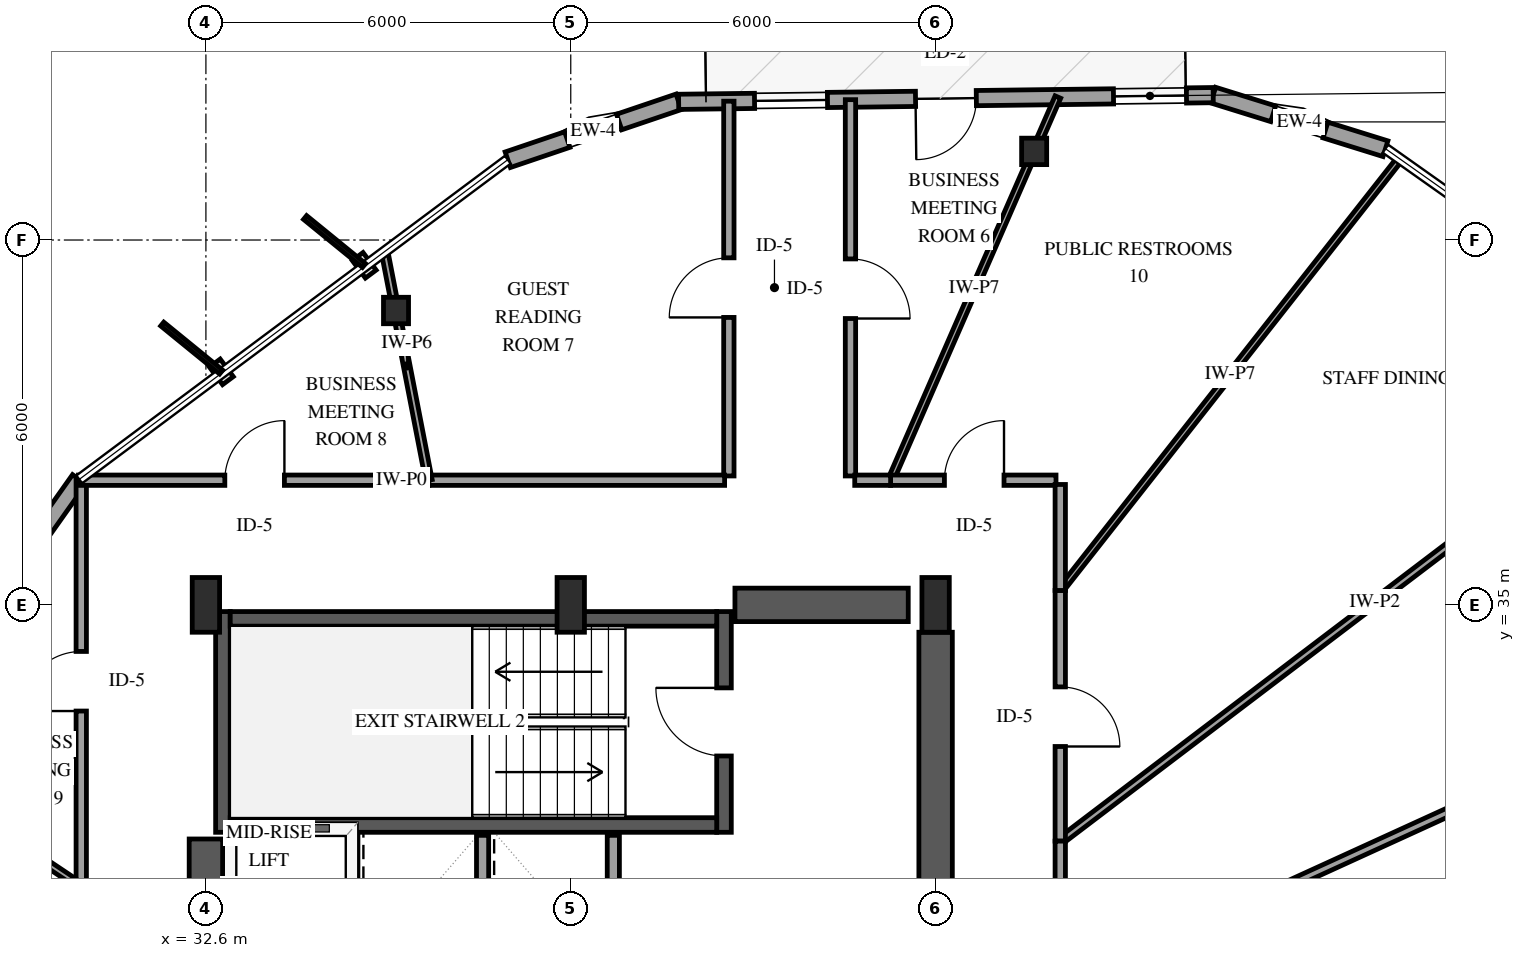
"""IFC4 building model, lengths in metres.
Left out: names, types, materials, properties, quantities, classifications, styles, units other than length and angle.
Written with IfcOpenShell. Run it as: python <this file> out.ifc"""

import sys

from ifc_helpers import new_model, si_unit, direction, frame, frame_2d, origin, origin_2d, place, context, subcontext, project, spatial, rectangle, i_section, extrude, element, fill, save


model = new_model("IFC4")
c1 = context("Model", 3, precision=1e-05, world=origin(), true_north=direction((0.0, 1.0)))
c2 = subcontext(c1, "Body", "Model", "MODEL_VIEW")
j1 = project(units=[si_unit("LENGTHUNIT", "METRE"), si_unit("PLANEANGLEUNIT", "RADIAN")], contexts=[c1])
p1 = place(None, origin())
s1 = spatial("IfcSite", under=j1, at=p1, CompositionType="ELEMENT")
p2 = place(p1, origin())
s2 = spatial("IfcBuilding", under=s1, at=p2, CompositionType="ELEMENT")
p3 = place(p2, frame((0.0, 0.0, 167.8)))
s3 = spatial("IfcBuildingStorey", under=s2, at=p3, CompositionType="ELEMENT", Elevation=167.8)
p4 = place(p3, frame((32.88, 31.26, 0.0), z_axis=(0.0, 0.0, 1.0), x_axis=(0.0, 1.0, 0.0)))
e1 = element("IfcWall", 1, at=p4, inside=s3, PredefinedType="SHEAR", context=c2, shape_type="SweptSolid", body=[
    extrude(rectangle(XDim=3.63, YDim=0.24, at=frame_2d((1.815, 0.0))), origin(), (0.0, 0.0, 1.0), 3.6),
])
p5 = place(p3, frame((41.12, 31.26, 0.0), z_axis=(0.0, 0.0, 1.0), x_axis=(0.0, 1.0, 0.0)))
e2 = element("IfcWall", 2, at=p5, inside=s3, PredefinedType="SHEAR", context=c2, shape_type="SweptSolid", body=[
    extrude(rectangle(XDim=3.63, YDim=0.24, at=frame_2d((1.815, 0.0))), origin(), (0.0, 0.0, 1.0), 3.6),
])
p6 = place(p5, frame((1.255, 0.0, 0.0)))
e3 = element("IfcOpeningElement", 3, at=p6, cuts=e2, PredefinedType="OPENING", context=c2, shape_type="SweptSolid", body=[
    extrude(rectangle(XDim=1.12, YDim=2.15, at=frame_2d((0.56, 1.075))), frame((0.0, 0.13, 0.0), z_axis=(0.0, -1.0, 0.0), x_axis=(1.0, 0.0, 0.0)), (0.0, 0.0, 1.0), 0.26),
])
for number, where, z_axis, x_axis in (
    (4, (33.0, 31.38, 0.0), (0.0, 0.0, 1.0), (1.0, 0.0, 0.0)),
    (5, (33.0, 34.77, 0.0), (0.0, 0.0, 1.0), (1.0, 0.0, 0.0)),
):
    element("IfcWall", number, at=place(p3, frame(where, z_axis=z_axis, x_axis=x_axis)), inside=s3, PredefinedType="SHEAR", context=c2, shape_type="SweptSolid", body=[
        extrude(rectangle(XDim=8.0, YDim=0.24, at=frame_2d((4.0, 0.0))), origin(), (0.0, 0.0, 1.0), 3.6),
    ])
p7 = place(p3, frame((32.6, 18.85, 0.0), z_axis=(0.0, 0.0, 1.0), x_axis=(0.0, 1.0, 0.0)))
e6 = element("IfcWall", 6, at=p7, inside=s3, PredefinedType="SHEAR", context=c2, shape_type="SweptSolid", body=[
    extrude(rectangle(XDim=12.3, YDim=0.55, at=frame_2d((6.15, 0.0))), origin(), (0.0, 0.0, 1.0), 3.6),
])
p8 = place(p3, frame((41.3, 35.0, 0.0), z_axis=(0.0, 0.0, 1.0), x_axis=(1.0, 0.0, 0.0)))
e7 = element("IfcWall", 7, at=p8, inside=s3, PredefinedType="SHEAR", context=c2, shape_type="SweptSolid", body=[
    extrude(rectangle(XDim=2.85, YDim=0.55, at=frame_2d((1.425, 0.0))), origin(), (0.0, 0.0, 1.0), 3.6),
])
p9 = place(p3, frame((44.6, 29.8, 0.0), z_axis=(0.0, 0.0, 1.0), x_axis=(0.0, 1.0, 0.0)))
e8 = element("IfcWall", 8, at=p9, inside=s3, PredefinedType="SHEAR", context=c2, shape_type="SweptSolid", body=[
    extrude(rectangle(XDim=4.75, YDim=0.55, at=frame_2d((2.375, 0.0))), origin(), (0.0, 0.0, 1.0), 3.6),
])
for number, where, z_axis, x_axis in (
    (9, (32.6, 35.0, 0.0), (0.0, 0.0, 1.0), (1.0, 0.0, 0.0)),
    (10, (38.6, 35.0, 0.0), (0.0, 0.0, 1.0), (1.0, 0.0, 0.0)),
    (11, (44.6, 35.0, 0.0), (0.0, 0.0, 1.0), (1.0, 0.0, 0.0)),
):
    element("IfcColumn", number, at=place(p3, frame(where, z_axis=z_axis, x_axis=x_axis)), inside=s3, PredefinedType="PILASTER", context=c2, shape_type="SweptSolid", body=[
        extrude(rectangle(XDim=0.45, YDim=0.9, at=origin_2d()), origin(), (0.0, 0.0, 1.0), 3.6),
    ])
for number, where, z_axis, x_axis in (
    (12, (46.221, 42.458, 0.0), (0.0, 0.0, 1.0), (1.0, 0.0, 0.0)),
    (13, (35.726, 39.841, 0.0), (0.0, 0.0, 1.0), (1.0, 0.0, 0.0)),
):
    element("IfcColumn", number, at=place(p3, frame(where, z_axis=z_axis, x_axis=x_axis)), inside=s3, PredefinedType="COLUMN", context=c2, shape_type="SweptSolid", body=[
        extrude(i_section(OverallWidth=0.412, OverallDepth=0.435, WebThickness=0.036, FlangeThickness=0.057, FilletRadius=0.038, at=origin_2d()), origin(), (0.0, 0.0, 1.0), 3.6),
    ])
p10 = place(p3, frame((51.998, 42.502, 0.0), z_axis=(0.0, 0.0, 1.0), x_axis=(-0.954868707694, 0.29702819911, 0.0)))
e14 = element("IfcWall", 14, at=p10, inside=s3, PredefinedType="SOLIDWALL", context=c2, shape_type="SweptSolid", body=[
    extrude(rectangle(XDim=2.966, YDim=0.27, at=frame_2d((1.483, 0.0))), origin(), (0.0, 0.0, 1.0), 2.679),
])
p11 = place(p10, frame((1.033, 0.0, 0.75)))
e15 = element("IfcOpeningElement", 15, at=p11, cuts=e14, PredefinedType="OPENING", context=c2, shape_type="SweptSolid", body=[
    extrude(rectangle(XDim=0.9, YDim=1.5, at=frame_2d((0.45, 0.75))), frame((0.0, 0.145, 0.0), z_axis=(0.0, -1.0, 0.0), x_axis=(1.0, 0.0, 0.0)), (0.0, 0.0, 1.0), 0.29),
])
p12 = place(p3, frame((40.374, 43.272, 0.0), z_axis=(0.0, 0.0, 1.0), x_axis=(-0.947099800271, -0.320939197242, 0.0)))
e16 = element("IfcWall", 16, at=p12, inside=s3, PredefinedType="SOLIDWALL", context=c2, shape_type="SweptSolid", body=[
    extrude(rectangle(XDim=2.967, YDim=0.27, at=frame_2d((1.483, 0.0))), origin(), (0.0, 0.0, 1.0), 2.679),
])
p13 = place(p12, frame((1.033, 0.0, 0.75)))
e17 = element("IfcOpeningElement", 17, at=p13, cuts=e16, PredefinedType="OPENING", context=c2, shape_type="SweptSolid", body=[
    extrude(rectangle(XDim=0.9, YDim=1.5, at=frame_2d((0.45, 0.75))), frame((0.0, 0.145, 0.0), z_axis=(0.0, -1.0, 0.0), x_axis=(1.0, 0.0, 0.0)), (0.0, 0.0, 1.0), 0.29),
])
p14 = place(p3, frame((49.165, 43.383, 0.0), z_axis=(0.0, 0.0, 1.0), x_axis=(-0.999921223342, -0.012551777187, 0.0)))
e18 = element("IfcWall", 18, at=p14, inside=s3, PredefinedType="SOLIDWALL", context=c2, shape_type="SweptSolid", body=[
    extrude(rectangle(XDim=8.792, YDim=0.25, at=frame_2d((4.396, 0.0))), origin(), (0.0, 0.0, 1.0), 2.679),
])
p15 = place(p14, frame((3.896, 0.0, 0.0)))
e19 = element("IfcOpeningElement", 19, at=p15, cuts=e18, PredefinedType="OPENING", context=c2, shape_type="SweptSolid", body=[
    extrude(rectangle(XDim=1.0, YDim=2.15, at=frame_2d((0.5, 1.075))), frame((0.0, 0.135, 0.0), z_axis=(0.0, -1.0, 0.0), x_axis=(1.0, 0.0, 0.0)), (0.0, 0.0, 1.0), 0.27),
])
p16 = place(p14, frame((0.44, 0.0, 0.72)))
e20 = element("IfcOpeningElement", 20, at=p16, cuts=e18, PredefinedType="OPENING", context=c2, shape_type="SweptSolid", body=[
    extrude(rectangle(XDim=1.2, YDim=1.6, at=frame_2d((0.6, 0.8))), frame((0.0, 0.135, 0.0), z_axis=(0.0, -1.0, 0.0), x_axis=(1.0, 0.0, 0.0)), (0.0, 0.0, 1.0), 0.27),
])
p17 = place(p14, frame((6.344, 0.0, 0.72)))
e21 = element("IfcOpeningElement", 21, at=p17, cuts=e18, PredefinedType="OPENING", context=c2, shape_type="SweptSolid", body=[
    extrude(rectangle(XDim=1.2, YDim=1.6, at=frame_2d((0.6, 0.8))), frame((0.0, 0.135, 0.0), z_axis=(0.0, -1.0, 0.0), x_axis=(1.0, 0.0, 0.0)), (0.0, 0.0, 1.0), 0.27),
])
p18 = place(p3, frame((30.517, 37.064, 0.0), z_axis=(0.0, 0.0, 1.0), x_axis=(-0.577542313639, -0.816360751112, 0.0)))
e22 = element("IfcWall", 22, at=p18, inside=s3, PredefinedType="SOLIDWALL", context=c2, shape_type="SweptSolid", body=[
    extrude(rectangle(XDim=2.967, YDim=0.27, at=frame_2d((1.483, 0.0))), origin(), (0.0, 0.0, 1.0), 2.679),
])
p19 = place(p18, frame((1.519, 0.0, 0.75)))
e23 = element("IfcOpeningElement", 23, at=p19, cuts=e22, PredefinedType="OPENING", context=c2, shape_type="SweptSolid", body=[
    extrude(rectangle(XDim=0.9, YDim=1.5, at=frame_2d((0.45, 0.75))), frame((0.0, 0.145, 0.0), z_axis=(0.0, -1.0, 0.0), x_axis=(1.0, 0.0, 0.0)), (0.0, 0.0, 1.0), 0.29),
])
for number, where, z_axis, x_axis in (
    (24, (35.0, 29.11, 0.0), (0.0, 0.0, 1.0), (0.0, 1.0, 0.0)),
    (25, (37.15, 29.11, 0.0), (0.0, 0.0, 1.0), (0.0, 1.0, 0.0)),
    (26, (39.3, 29.11, 0.0), (0.0, 0.0, 1.0), (0.0, 1.0, 0.0)),
):
    element("IfcWall", number, at=place(p3, frame(where, z_axis=z_axis, x_axis=x_axis)), inside=s3, PredefinedType="SOLIDWALL", context=c2, shape_type="SweptSolid", body=[
        extrude(rectangle(XDim=2.1, YDim=0.2, at=frame_2d((1.05, 0.0))), origin(), (0.0, 0.0, 1.0), 3.3),
    ])
p20 = place(p3, frame((46.65, 28.677, 0.0), z_axis=(0.0, 0.0, 1.0), x_axis=(0.909598522635, 0.41548830022, 0.0)))
e27 = element("IfcWall", 27, at=p20, inside=s3, PredefinedType="PARTITIONING", context=c2, shape_type="SweptSolid", body=[
    extrude(rectangle(XDim=15.644, YDim=0.14, at=frame_2d((7.822, 0.0))), origin(), (0.0, 0.0, 1.0), 3.3),
])
p21 = place(p3, frame((46.65, 31.115, 0.0), z_axis=(0.0, 0.0, 1.0), x_axis=(0.796355255038, 0.604829155856, 0.0)))
e28 = element("IfcWall", 28, at=p21, inside=s3, PredefinedType="PARTITIONING", context=c2, shape_type="SweptSolid", body=[
    extrude(rectangle(XDim=12.986, YDim=0.12, at=frame_2d((6.493, 0.0))), origin(), (0.0, 0.0, 1.0), 3.3),
])
p22 = place(p3, frame((46.65, 35.237, 0.0), z_axis=(0.0, 0.0, 1.0), x_axis=(0.618238163574, 0.785990822529, 0.0)))
e29 = element("IfcWall", 29, at=p22, inside=s3, PredefinedType="PARTITIONING", context=c2, shape_type="SweptSolid", body=[
    extrude(rectangle(XDim=9.031, YDim=0.1, at=frame_2d((4.515, 0.0))), origin(), (0.0, 0.0, 1.0), 3.3),
])
p23 = place(p3, frame((43.86, 37.05, 0.0), z_axis=(0.0, 0.0, 1.0), x_axis=(0.400120171494, 0.916462682472, 0.0)))
e30 = element("IfcWall", 30, at=p23, inside=s3, PredefinedType="PARTITIONING", context=c2, shape_type="SweptSolid", body=[
    extrude(rectangle(XDim=6.875, YDim=0.1, at=frame_2d((3.438, 0.0))), origin(), (0.0, 0.0, 1.0), 2.595),
])
p24 = place(p3, frame((30.55, 30.37, 0.0), z_axis=(0.0, 0.0, 1.0), x_axis=(0.0, 1.0, 0.0)))
e31 = element("IfcWall", 31, at=p24, inside=s3, PredefinedType="PARTITIONING", context=c2, shape_type="SweptSolid", body=[
    extrude(rectangle(XDim=6.718, YDim=0.17, at=frame_2d((3.359, 0.0))), origin(), (0.0, 0.0, 1.0), 3.3),
])
p25 = place(p24, frame((2.884, 0.0, 0.0)))
e32 = element("IfcOpeningElement", 32, at=p25, cuts=e31, PredefinedType="OPENING", context=c2, shape_type="SweptSolid", body=[
    extrude(rectangle(XDim=0.98, YDim=2.15, at=frame_2d((0.49, 1.075))), frame((0.0, 0.095, 0.0), z_axis=(0.0, -1.0, 0.0), x_axis=(1.0, 0.0, 0.0)), (0.0, 0.0, 1.0), 0.19),
])
p26 = place(p3, frame((43.2, 43.308, 0.0), z_axis=(0.0, 0.0, 1.0), x_axis=(0.0, -1.0, 0.0)))
e33 = element("IfcWall", 33, at=p26, inside=s3, PredefinedType="PARTITIONING", context=c2, shape_type="SweptSolid", body=[
    extrude(rectangle(XDim=6.188, YDim=0.17, at=frame_2d((3.094, 0.0))), origin(), (0.0, 0.0, 1.0), 3.3),
])
p27 = place(p26, frame((2.619, 0.0, 0.0)))
e34 = element("IfcOpeningElement", 34, at=p27, cuts=e33, PredefinedType="OPENING", context=c2, shape_type="SweptSolid", body=[
    extrude(rectangle(XDim=0.98, YDim=2.15, at=frame_2d((0.49, 1.075))), frame((0.0, 0.095, 0.0), z_axis=(0.0, -1.0, 0.0), x_axis=(1.0, 0.0, 0.0)), (0.0, 0.0, 1.0), 0.19),
])
p28 = place(p3, frame((41.2, 37.12, 0.0), z_axis=(0.0, 0.0, 1.0), x_axis=(0.0, 1.0, 0.0)))
e35 = element("IfcWall", 35, at=p28, inside=s3, PredefinedType="PARTITIONING", context=c2, shape_type="SweptSolid", body=[
    extrude(rectangle(XDim=6.163, YDim=0.17, at=frame_2d((3.082, 0.0))), origin(), (0.0, 0.0, 1.0), 2.678),
])
p29 = place(p28, frame((2.607, 0.0, 0.0)))
e36 = element("IfcOpeningElement", 36, at=p29, cuts=e35, PredefinedType="OPENING", context=c2, shape_type="SweptSolid", body=[
    extrude(rectangle(XDim=0.98, YDim=2.15, at=frame_2d((0.49, 1.075))), frame((0.0, 0.095, 0.0), z_axis=(0.0, -1.0, 0.0), x_axis=(1.0, 0.0, 0.0)), (0.0, 0.0, 1.0), 0.19),
])
p30 = place(p3, frame((30.504, 37.05, 0.0), z_axis=(0.0, 0.0, 1.0), x_axis=(1.0, 0.0, 0.0)))
e37 = element("IfcWall", 37, at=p30, inside=s3, PredefinedType="PARTITIONING", context=c2, shape_type="SweptSolid", body=[
    extrude(rectangle(XDim=5.763, YDim=0.17, at=frame_2d((2.882, 0.0))), origin(), (0.0, 0.0, 1.0), 3.3),
])
p31 = place(p30, frame((2.407, 0.0, 0.0)))
e38 = element("IfcOpeningElement", 38, at=p31, cuts=e37, PredefinedType="OPENING", context=c2, shape_type="SweptSolid", body=[
    extrude(rectangle(XDim=0.98, YDim=2.15, at=frame_2d((0.49, 1.075))), frame((0.0, 0.095, 0.0), z_axis=(0.0, -1.0, 0.0), x_axis=(1.0, 0.0, 0.0)), (0.0, 0.0, 1.0), 0.19),
])
p32 = place(p3, frame((36.267, 37.05, 0.0), z_axis=(0.0, 0.0, 1.0), x_axis=(1.0, 0.0, 0.0)))
e39 = element("IfcWall", 39, at=p32, inside=s3, PredefinedType="PARTITIONING", context=c2, shape_type="SweptSolid", body=[
    extrude(rectangle(XDim=4.863, YDim=0.17, at=frame_2d((2.431, 0.0))), origin(), (0.0, 0.0, 1.0), 3.3),
])
p33 = place(p3, frame((46.65, 35.237, 0.0), z_axis=(0.0, 0.0, 1.0), x_axis=(0.0, -1.0, 0.0)))
e40 = element("IfcWall", 40, at=p33, inside=s3, PredefinedType="PARTITIONING", context=c2, shape_type="SweptSolid", body=[
    extrude(rectangle(XDim=4.122, YDim=0.17, at=frame_2d((2.061, 0.0))), origin(), (0.0, 0.0, 1.0), 3.3),
])
p34 = place(p33, frame((1.586, 0.0, 0.0)))
e41 = element("IfcOpeningElement", 41, at=p34, cuts=e40, PredefinedType="OPENING", context=c2, shape_type="SweptSolid", body=[
    extrude(rectangle(XDim=0.98, YDim=2.15, at=frame_2d((0.49, 1.075))), frame((0.0, 0.095, 0.0), z_axis=(0.0, -1.0, 0.0), x_axis=(1.0, 0.0, 0.0)), (0.0, 0.0, 1.0), 0.19),
])
p35 = place(p3, frame((36.267, 37.05, 0.0), z_axis=(0.0, 0.0, 1.0), x_axis=(-0.190386673519, 0.981709180229, 0.0)))
e42 = element("IfcWall", 42, at=p35, inside=s3, PredefinedType="PARTITIONING", context=c2, shape_type="SweptSolid", body=[
    extrude(rectangle(XDim=3.829, YDim=0.11, at=frame_2d((1.915, 0.0))), origin(), (0.0, 0.0, 1.0), 2.595),
])
p36 = place(p3, frame((30.55, 30.37, 0.0), z_axis=(0.0, 0.0, 1.0), x_axis=(-0.831669772262, 0.555270555591, 0.0)))
e43 = element("IfcWall", 43, at=p36, inside=s3, PredefinedType="PARTITIONING", context=c2, shape_type="SweptSolid", body=[
    extrude(rectangle(XDim=3.062, YDim=0.11, at=frame_2d((1.531, 0.0))), origin(), (0.0, 0.0, 1.0), 3.3),
])
p37 = place(p3, frame((43.86, 37.05, 0.0), z_axis=(0.0, 0.0, 1.0), x_axis=(1.0, 0.0, 0.0)))
e44 = element("IfcWall", 44, at=p37, inside=s3, PredefinedType="PARTITIONING", context=c2, shape_type="SweptSolid", body=[
    extrude(rectangle(XDim=2.72, YDim=0.17, at=frame_2d((1.36, 0.0))), origin(), (0.0, 0.0, 1.0), 3.3),
])
p38 = place(p37, frame((0.885, 0.0, 0.0)))
e45 = element("IfcOpeningElement", 45, at=p38, cuts=e44, PredefinedType="OPENING", context=c2, shape_type="SweptSolid", body=[
    extrude(rectangle(XDim=0.98, YDim=2.15, at=frame_2d((0.49, 1.075))), frame((0.0, 0.095, 0.0), z_axis=(0.0, -1.0, 0.0), x_axis=(1.0, 0.0, 0.0)), (0.0, 0.0, 1.0), 0.19),
])
p39 = place(p3, frame((46.65, 31.115, 0.0), z_axis=(0.0, 0.0, 1.0), x_axis=(0.0, -1.0, 0.0)))
e46 = element("IfcWall", 46, at=p39, inside=s3, PredefinedType="PARTITIONING", context=c2, shape_type="SweptSolid", body=[
    extrude(rectangle(XDim=2.438, YDim=0.17, at=frame_2d((1.219, 0.0))), origin(), (0.0, 0.0, 1.0), 3.3),
])
p40 = place(p39, frame((0.744, 0.0, 0.0)))
e47 = element("IfcOpeningElement", 47, at=p40, cuts=e46, PredefinedType="OPENING", context=c2, shape_type="SweptSolid", body=[
    extrude(rectangle(XDim=0.98, YDim=2.15, at=frame_2d((0.49, 1.075))), frame((0.0, 0.095, 0.0), z_axis=(0.0, -1.0, 0.0), x_axis=(1.0, 0.0, 0.0)), (0.0, 0.0, 1.0), 0.19),
])
p41 = place(p3, frame((46.65, 36.98, 0.0), z_axis=(0.0, 0.0, 1.0), x_axis=(0.0, -1.0, 0.0)))
e48 = element("IfcWall", 48, at=p41, inside=s3, PredefinedType="PARTITIONING", context=c2, shape_type="SweptSolid", body=[
    extrude(rectangle(XDim=1.743, YDim=0.17, at=frame_2d((0.872, 0.0))), origin(), (0.0, 0.0, 1.0), 3.3),
])
p42 = place(p3, frame((43.27, 37.05, 0.0), z_axis=(0.0, 0.0, 1.0), x_axis=(1.0, 0.0, 0.0)))
e49 = element("IfcWall", 49, at=p42, inside=s3, PredefinedType="PARTITIONING", context=c2, shape_type="SweptSolid", body=[
    extrude(rectangle(XDim=0.59, YDim=0.17, at=frame_2d((0.295, 0.0))), origin(), (0.0, 0.0, 1.0), 3.3),
])
p43 = place(p11, origin())
e50 = element("IfcWindow", 50, at=p43, inside=s3, PartitioningType="SINGLE_PANEL", PredefinedType="WINDOW", context=c2, shape_type="SweptSolid", body=[
    extrude(rectangle(XDim=0.9, YDim=1.5, at=frame_2d((0.45, 0.75))), frame((0.0, 0.03, 0.0), z_axis=(0.0, -1.0, 0.0), x_axis=(1.0, 0.0, 0.0)), (0.0, 0.0, 1.0), 0.06),
])
fill(e15, e50)
p44 = place(p13, origin())
e51 = element("IfcWindow", 51, at=p44, inside=s3, PartitioningType="SINGLE_PANEL", PredefinedType="WINDOW", context=c2, shape_type="SweptSolid", body=[
    extrude(rectangle(XDim=0.9, YDim=1.5, at=frame_2d((0.45, 0.75))), frame((0.0, 0.03, 0.0), z_axis=(0.0, -1.0, 0.0), x_axis=(1.0, 0.0, 0.0)), (0.0, 0.0, 1.0), 0.06),
])
fill(e17, e51)
p45 = place(p15, origin())
e52 = element("IfcDoor", 52, at=p45, inside=s3, OperationType="SINGLE_SWING_RIGHT", PredefinedType="DOOR", context=c2, shape_type="SweptSolid", body=[
    extrude(rectangle(XDim=1.0, YDim=2.15, at=frame_2d((0.5, 1.075))), frame((0.0, 0.025, 0.0), z_axis=(0.0, -1.0, 0.0), x_axis=(1.0, 0.0, 0.0)), (0.0, 0.0, 1.0), 0.05),
])
fill(e19, e52)
p46 = place(p16, origin())
e53 = element("IfcWindow", 53, at=p46, inside=s3, PartitioningType="SINGLE_PANEL", PredefinedType="WINDOW", context=c2, shape_type="SweptSolid", body=[
    extrude(rectangle(XDim=1.2, YDim=1.6, at=frame_2d((0.6, 0.8))), frame((0.0, 0.03, 0.0), z_axis=(0.0, -1.0, 0.0), x_axis=(1.0, 0.0, 0.0)), (0.0, 0.0, 1.0), 0.06),
])
fill(e20, e53)
p47 = place(p17, origin())
e54 = element("IfcWindow", 54, at=p47, inside=s3, PartitioningType="SINGLE_PANEL", PredefinedType="WINDOW", context=c2, shape_type="SweptSolid", body=[
    extrude(rectangle(XDim=1.2, YDim=1.6, at=frame_2d((0.6, 0.8))), frame((0.0, 0.03, 0.0), z_axis=(0.0, -1.0, 0.0), x_axis=(1.0, 0.0, 0.0)), (0.0, 0.0, 1.0), 0.06),
])
fill(e21, e54)
p48 = place(p6, origin())
e55 = element("IfcDoor", 55, at=p48, inside=s3, OperationType="SINGLE_SWING_RIGHT", PredefinedType="DOOR", context=c2, shape_type="SweptSolid", body=[
    extrude(rectangle(XDim=1.12, YDim=2.15, at=frame_2d((0.56, 1.075))), frame((0.0, 0.025, 0.0), z_axis=(0.0, -1.0, 0.0), x_axis=(1.0, 0.0, 0.0)), (0.0, 0.0, 1.0), 0.05),
])
fill(e3, e55)
p49 = place(p25, origin())
e56 = element("IfcDoor", 56, at=p49, inside=s3, OperationType="SINGLE_SWING_LEFT", PredefinedType="DOOR", context=c2, shape_type="SweptSolid", body=[
    extrude(rectangle(XDim=0.98, YDim=2.15, at=frame_2d((0.49, 1.075))), frame((0.0, 0.025, 0.0), z_axis=(0.0, -1.0, 0.0), x_axis=(1.0, 0.0, 0.0)), (0.0, 0.0, 1.0), 0.05),
])
fill(e32, e56)
p50 = place(p27, origin())
e57 = element("IfcDoor", 57, at=p50, inside=s3, OperationType="SINGLE_SWING_RIGHT", PredefinedType="DOOR", context=c2, shape_type="SweptSolid", body=[
    extrude(rectangle(XDim=0.98, YDim=2.15, at=frame_2d((0.49, 1.075))), frame((0.0, 0.025, 0.0), z_axis=(0.0, -1.0, 0.0), x_axis=(1.0, 0.0, 0.0)), (0.0, 0.0, 1.0), 0.05),
])
fill(e34, e57)
p51 = place(p29, origin())
e58 = element("IfcDoor", 58, at=p51, inside=s3, OperationType="SINGLE_SWING_LEFT", PredefinedType="DOOR", context=c2, shape_type="SweptSolid", body=[
    extrude(rectangle(XDim=0.98, YDim=2.15, at=frame_2d((0.49, 1.075))), frame((0.0, 0.025, 0.0), z_axis=(0.0, -1.0, 0.0), x_axis=(1.0, 0.0, 0.0)), (0.0, 0.0, 1.0), 0.05),
])
fill(e36, e58)
p52 = place(p31, origin())
e59 = element("IfcDoor", 59, at=p52, inside=s3, OperationType="SINGLE_SWING_RIGHT", PredefinedType="DOOR", context=c2, shape_type="SweptSolid", body=[
    extrude(rectangle(XDim=0.98, YDim=2.15, at=frame_2d((0.49, 1.075))), frame((0.0, 0.025, 0.0), z_axis=(0.0, -1.0, 0.0), x_axis=(1.0, 0.0, 0.0)), (0.0, 0.0, 1.0), 0.05),
])
fill(e38, e59)
p53 = place(p34, origin())
e60 = element("IfcDoor", 60, at=p53, inside=s3, OperationType="SINGLE_SWING_RIGHT", PredefinedType="DOOR", context=c2, shape_type="SweptSolid", body=[
    extrude(rectangle(XDim=0.98, YDim=2.15, at=frame_2d((0.49, 1.075))), frame((0.0, 0.025, 0.0), z_axis=(0.0, -1.0, 0.0), x_axis=(1.0, 0.0, 0.0)), (0.0, 0.0, 1.0), 0.05),
])
fill(e41, e60)
p54 = place(p38, origin())
e61 = element("IfcDoor", 61, at=p54, inside=s3, OperationType="SINGLE_SWING_RIGHT", PredefinedType="DOOR", context=c2, shape_type="SweptSolid", body=[
    extrude(rectangle(XDim=0.98, YDim=2.15, at=frame_2d((0.49, 1.075))), frame((0.0, 0.025, 0.0), z_axis=(0.0, -1.0, 0.0), x_axis=(1.0, 0.0, 0.0)), (0.0, 0.0, 1.0), 0.05),
])
fill(e45, e61)
save(model, sys.argv[1])
